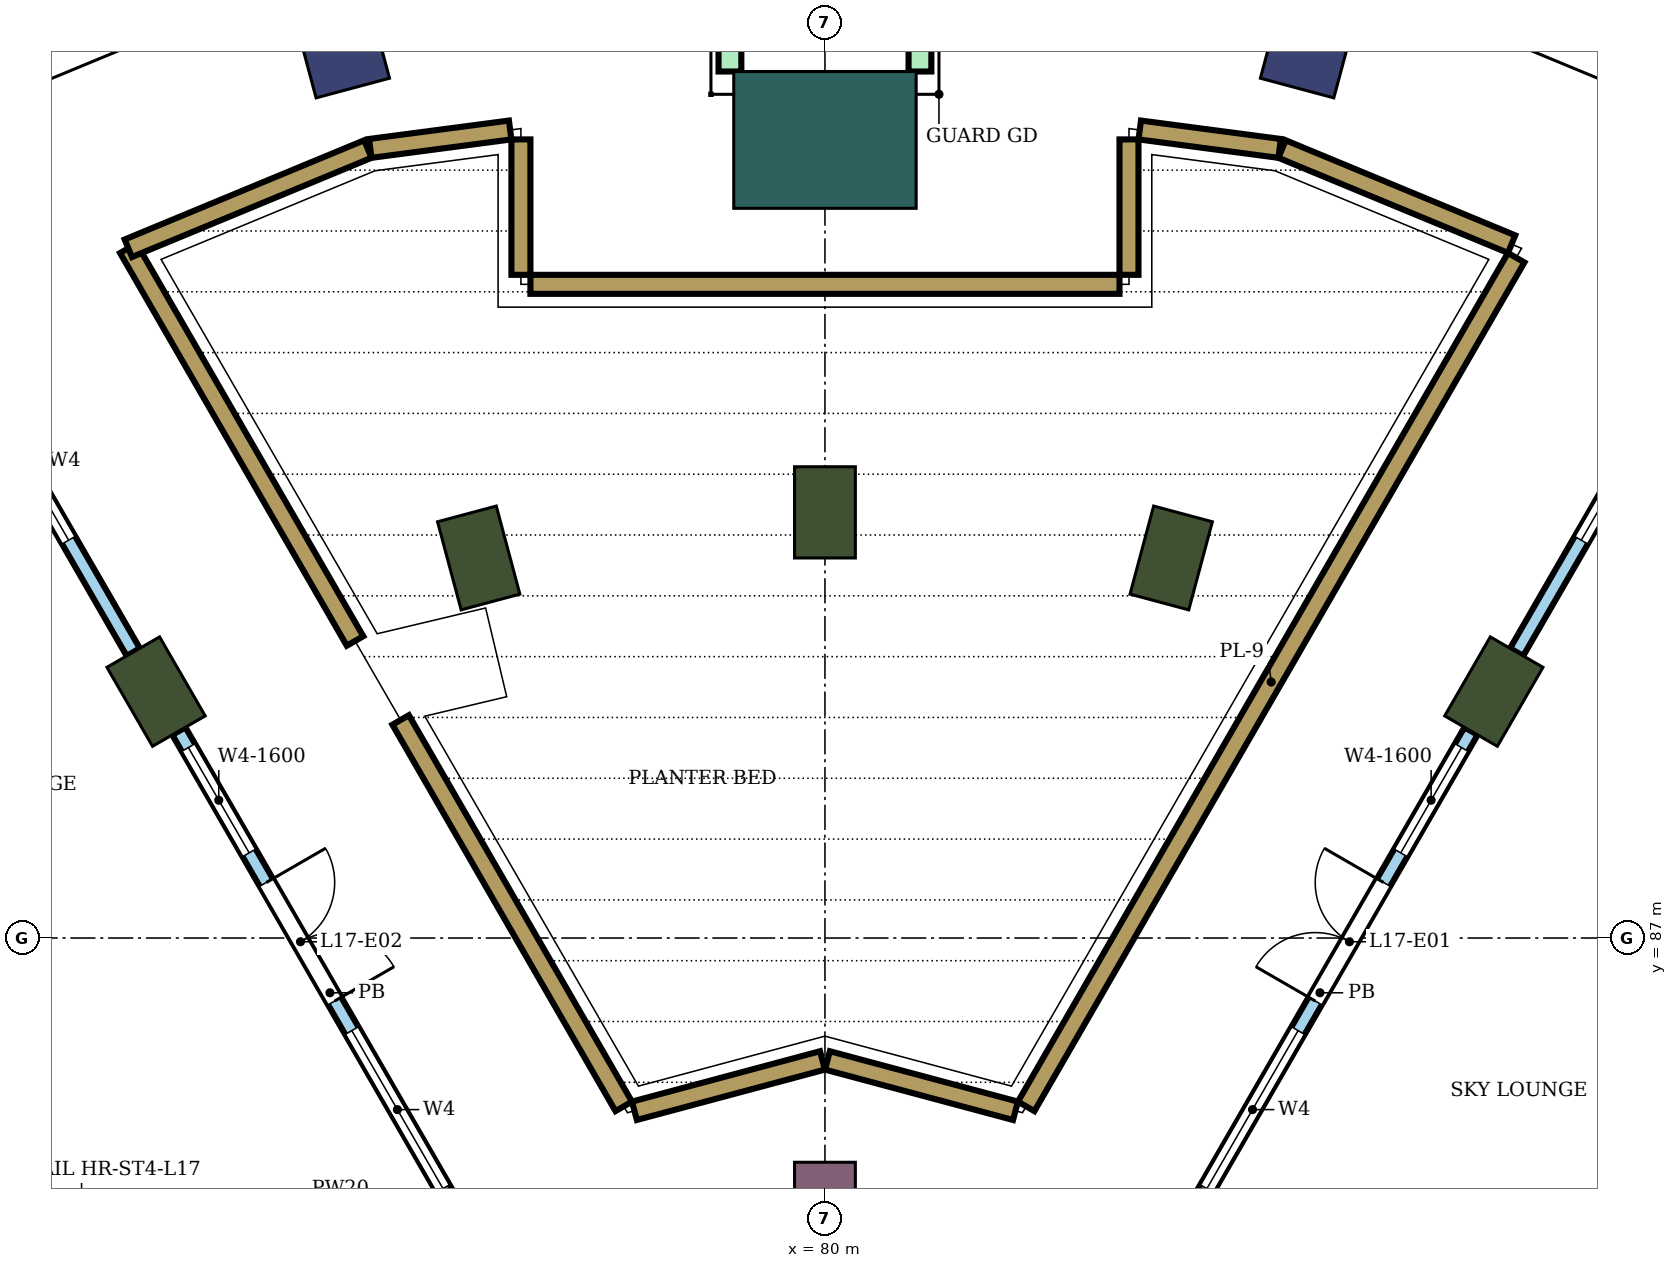
"""IFC4 building model, lengths in metres.
Left out: names, types, materials, properties, quantities, classifications, styles, units other than length and angle.
Written with IfcOpenShell. Run it as: python <this file> out.ifc"""

import sys

from ifc_helpers import new_model, si_unit, direction, frame, frame_2d, origin, origin_2d, place, context, subcontext, project, spatial, rectangle, extrude, element, fill, save


model = new_model("IFC4")
c1 = context("Model", 3, precision=1e-05, world=origin(), true_north=direction((0.0, 1.0)))
c2 = subcontext(c1, "Body", "Model", "MODEL_VIEW")
j1 = project(units=[si_unit("LENGTHUNIT", "METRE"), si_unit("PLANEANGLEUNIT", "RADIAN")], contexts=[c1])
p1 = place(None, origin())
s1 = spatial("IfcSite", under=j1, at=p1, CompositionType="ELEMENT")
p2 = place(p1, origin())
s2 = spatial("IfcBuilding", under=s1, at=p2, CompositionType="ELEMENT")
p3 = place(p2, frame((0.0, 0.0, 74.4)))
s3 = spatial("IfcBuildingStorey", under=s2, at=p3, CompositionType="ELEMENT", Elevation=74.4)
for number, where, z_axis, x_axis in (
    (1, (86.367, 98.762, 0.0), (0.0, 0.0, 1.0), (0.259, 0.966, 0.0)),
    (2, (73.633, 98.762, 0.0), (0.0, 0.0, 1.0), (-0.259, 0.966, 0.0)),
):
    element("IfcColumn", number, at=place(p3, frame(where, z_axis=z_axis, x_axis=x_axis)), inside=s3, PredefinedType="COLUMN", context=c2, shape_type="SweptSolid", body=[
        extrude(rectangle(XDim=1.2, YDim=1.0, at=origin_2d()), origin(), (0.0, 0.0, 1.0), 8.0),
    ])
for number, where, z_axis, x_axis in (
    (3, (88.8, 90.242, 0.0), (0.0, 0.0, 1.0), (0.5, 0.866, 0.0)),
    (4, (84.555, 92.0, 0.0), (0.0, 0.0, 1.0), (0.259, 0.966, 0.0)),
    (5, (80.0, 92.6, 0.0), (0.0, 0.0, 1.0), (0.0, 1.0, 0.0)),
    (6, (75.445, 92.0, 0.0), (0.0, 0.0, 1.0), (-0.259, 0.966, 0.0)),
    (7, (71.2, 90.242, 0.0), (0.0, 0.0, 1.0), (-0.5, 0.866, 0.0)),
):
    element("IfcColumn", number, at=place(p3, frame(where, z_axis=z_axis, x_axis=x_axis)), inside=s3, PredefinedType="COLUMN", context=c2, shape_type="SweptSolid", body=[
        extrude(rectangle(XDim=1.2, YDim=0.8, at=origin_2d()), origin(), (0.0, 0.0, 1.0), 8.0),
    ])
p4 = place(p3, frame((80.0, 83.6, 0.0), z_axis=(0.0, 0.0, 1.0), x_axis=(0.0, 1.0, 0.0)))
e8 = element("IfcColumn", 8, at=p4, inside=s3, PredefinedType="COLUMN", context=c2, shape_type="SweptSolid", body=[
    extrude(rectangle(XDim=0.9, YDim=0.8, at=origin_2d()), origin(), (0.0, 0.0, 1.0), 8.0),
])
p5 = place(p3, frame((80.0, 97.5, 0.0), z_axis=(0.0, 0.0, 1.0), x_axis=(0.0, 1.0, 0.0)))
e9 = element("IfcColumn", 9, at=p5, inside=s3, PredefinedType="COLUMN", context=c2, shape_type="SweptSolid", body=[
    extrude(rectangle(XDim=1.8, YDim=2.4, at=origin_2d()), origin(), (0.0, 0.0, 1.0), 8.0),
])
for number, where, z_axis, x_axis in (
    (10, (81.25, 98.4, 0.0), (0.0, 0.0, 1.0), (0.0, 1.0, 0.0)),
    (11, (78.75, 98.4, 0.0), (0.0, 0.0, 1.0), (0.0, 1.0, 0.0)),
):
    element("IfcWall", number, at=place(p3, frame(where, z_axis=z_axis, x_axis=x_axis)), inside=s3, PredefinedType="NOTDEFINED", context=c2, shape_type="SweptSolid", body=[
        extrude(rectangle(XDim=2.416, YDim=0.3, at=frame_2d((1.208, 0.0))), origin(), (0.0, 0.0, 1.0), 8.0),
    ])
p6 = place(p3, frame((70.835, 96.074, 0.0), z_axis=(0.0, 0.0, 1.0), x_axis=(0.500003486784, -0.866023390679, 0.0)))
e12 = element("IfcWall", 12, at=p6, inside=s3, PredefinedType="USERDEFINED", context=c2, shape_type="SweptSolid", body=[
    extrude(rectangle(XDim=5.966, YDim=0.25, at=frame_2d((2.983, 0.0))), origin(), (0.0, 0.0, 1.0), 0.6),
])
p7 = place(p3, frame((74.418, 89.869, 0.0), z_axis=(0.0, 0.0, 1.0), x_axis=(0.499999689456, -0.866025583077, 0.0)))
e13 = element("IfcWall", 13, at=p7, inside=s3, PredefinedType="USERDEFINED", context=c2, shape_type="SweptSolid", body=[
    extrude(rectangle(XDim=5.87, YDim=0.25, at=frame_2d((2.935, 0.0))), origin(), (0.0, 0.0, 1.0), 0.6),
])
for number, where, z_axis, x_axis in (
    (14, (77.493, 84.727, 0.0), (0.0, 0.0, 1.0), (0.966, 0.259, 0.0)),
    (15, (80.032, 85.39, 0.0), (0.0, 0.0, 1.0), (0.966, -0.259, 0.0)),
):
    element("IfcWall", number, at=place(p3, frame(where, z_axis=z_axis, x_axis=x_axis)), inside=s3, PredefinedType="USERDEFINED", context=c2, shape_type="SweptSolid", body=[
        extrude(rectangle(XDim=2.562, YDim=0.25, at=frame_2d((1.281, 0.0))), origin(), (0.0, 0.0, 1.0), 0.6),
    ])
p8 = place(p3, frame((82.647, 84.785, 0.0), z_axis=(0.0, 0.0, 1.0), x_axis=(0.499992370413, 0.866029808684, 0.0)))
e16 = element("IfcWall", 16, at=p8, inside=s3, PredefinedType="USERDEFINED", context=c2, shape_type="SweptSolid", body=[
    extrude(rectangle(XDim=12.893, YDim=0.25, at=frame_2d((6.446, 0.0))), origin(), (0.0, 0.0, 1.0), 0.6),
])
p9 = place(p3, frame((89.033, 96.129, 0.0), z_axis=(0.0, 0.0, 1.0), x_axis=(-0.923863886655, 0.382721202621, 0.0)))
e17 = element("IfcWall", 17, at=p9, inside=s3, PredefinedType="USERDEFINED", context=c2, shape_type="SweptSolid", body=[
    extrude(rectangle(XDim=3.269, YDim=0.25, at=frame_2d((1.634, 0.0))), origin(), (0.0, 0.0, 1.0), 0.6),
])
p10 = place(p3, frame((85.982, 97.388, 0.0), z_axis=(0.0, 0.0, 1.0), x_axis=(-0.991436829887, 0.130587182926, 0.0)))
e18 = element("IfcWall", 18, at=p10, inside=s3, PredefinedType="USERDEFINED", context=c2, shape_type="SweptSolid", body=[
    extrude(rectangle(XDim=1.856, YDim=0.25, at=frame_2d((0.928, 0.0))), origin(), (0.0, 0.0, 1.0), 0.6),
])
p11 = place(p3, frame((84.0, 97.507, 0.0), z_axis=(0.0, 0.0, 1.0), x_axis=(0.0, -1.0, 0.0)))
e19 = element("IfcWall", 19, at=p11, inside=s3, PredefinedType="USERDEFINED", context=c2, shape_type="SweptSolid", body=[
    extrude(rectangle(XDim=1.781, YDim=0.25, at=frame_2d((0.891, 0.0))), origin(), (0.0, 0.0, 1.0), 0.6),
])
p12 = place(p3, frame((83.875, 95.6, 0.0), z_axis=(0.0, 0.0, 1.0), x_axis=(-1.0, 0.0, 0.0)))
e20 = element("IfcWall", 20, at=p12, inside=s3, PredefinedType="USERDEFINED", context=c2, shape_type="SweptSolid", body=[
    extrude(rectangle(XDim=7.75, YDim=0.25, at=frame_2d((3.875, 0.0))), origin(), (0.0, 0.0, 1.0), 0.6),
])
p13 = place(p3, frame((76.0, 95.725, 0.0), z_axis=(0.0, 0.0, 1.0), x_axis=(0.0, 1.0, 0.0)))
e21 = element("IfcWall", 21, at=p13, inside=s3, PredefinedType="USERDEFINED", context=c2, shape_type="SweptSolid", body=[
    extrude(rectangle(XDim=1.781, YDim=0.25, at=frame_2d((0.891, 0.0))), origin(), (0.0, 0.0, 1.0), 0.6),
])
p14 = place(p3, frame((75.859, 97.631, 0.0), z_axis=(0.0, 0.0, 1.0), x_axis=(-0.991436829887, -0.130587182926, 0.0)))
e22 = element("IfcWall", 22, at=p14, inside=s3, PredefinedType="USERDEFINED", context=c2, shape_type="SweptSolid", body=[
    extrude(rectangle(XDim=1.856, YDim=0.25, at=frame_2d((0.928, 0.0))), origin(), (0.0, 0.0, 1.0), 0.6),
])
p15 = place(p3, frame((73.986, 97.38, 0.0), z_axis=(0.0, 0.0, 1.0), x_axis=(-0.923871147788, -0.38270367425, 0.0)))
e23 = element("IfcWall", 23, at=p15, inside=s3, PredefinedType="USERDEFINED", context=c2, shape_type="SweptSolid", body=[
    extrude(rectangle(XDim=3.411, YDim=0.25, at=frame_2d((1.706, 0.0))), origin(), (0.0, 0.0, 1.0), 0.6),
])
p16 = place(p3, frame((84.525, 82.838, 0.0), z_axis=(0.0, 0.0, 1.0), x_axis=(0.50001663867, 0.86601579723, 0.0)))
e24 = element("IfcWall", 24, at=p16, inside=s3, PredefinedType="NOTDEFINED", context=c2, shape_type="SweptSolid", body=[
    extrude(rectangle(XDim=7.95, YDim=0.2, at=frame_2d((3.975, 0.0))), origin(), (0.0, 0.0, 1.0), 8.0),
])
p17 = place(p16, frame((1.0, 0.0, 0.3)))
e25 = element("IfcOpeningElement", 25, at=p17, cuts=e24, PredefinedType="OPENING", context=c2, shape_type="SweptSolid", body=[
    extrude(rectangle(XDim=2.4, YDim=3.6, at=frame_2d((1.2, 1.8))), frame((0.0, 0.11, 0.0), z_axis=(0.0, -1.0, 0.0), x_axis=(1.0, 0.0, 0.0)), (0.0, 0.0, 1.0), 0.22),
])
p18 = place(p16, frame((3.85, 0.0, 0.0)))
e26 = element("IfcOpeningElement", 26, at=p18, cuts=e24, PredefinedType="OPENING", context=c2, shape_type="SweptSolid", body=[
    extrude(rectangle(XDim=1.8, YDim=2.4, at=frame_2d((0.9, 1.2))), frame((0.0, 0.11, 0.0), z_axis=(0.0, -1.0, 0.0), x_axis=(1.0, 0.0, 0.0)), (0.0, 0.0, 1.0), 0.22),
])
p19 = place(p16, frame((6.1, 0.0, 0.3)))
e27 = element("IfcOpeningElement", 27, at=p19, cuts=e24, PredefinedType="OPENING", context=c2, shape_type="SweptSolid", body=[
    extrude(rectangle(XDim=1.6, YDim=3.6, at=frame_2d((0.8, 1.8))), frame((0.0, 0.11, 0.0), z_axis=(0.0, -1.0, 0.0), x_axis=(1.0, 0.0, 0.0)), (0.0, 0.0, 1.0), 0.22),
])
p20 = place(p3, frame((89.1, 90.762, 0.0), z_axis=(0.0, 0.0, 1.0), x_axis=(0.499987231761, 0.866032775405, 0.0)))
e28 = element("IfcWall", 28, at=p20, inside=s3, PredefinedType="NOTDEFINED", context=c2, shape_type="SweptSolid", body=[
    extrude(rectangle(XDim=5.8, YDim=0.2, at=frame_2d((2.9, 0.0))), origin(), (0.0, 0.0, 1.0), 8.0),
])
p21 = place(p20, frame((1.7, 0.0, 0.3)))
e29 = element("IfcOpeningElement", 29, at=p21, cuts=e28, PredefinedType="OPENING", context=c2, shape_type="SweptSolid", body=[
    extrude(rectangle(XDim=2.4, YDim=3.6, at=frame_2d((1.2, 1.8))), frame((0.0, 0.11, 0.0), z_axis=(0.0, -1.0, 0.0), x_axis=(1.0, 0.0, 0.0)), (0.0, 0.0, 1.0), 0.22),
])
p22 = place(p3, frame((75.475, 82.838, 0.0), z_axis=(0.0, 0.0, 1.0), x_axis=(-0.50001663867, 0.86601579723, 0.0)))
e30 = element("IfcWall", 30, at=p22, inside=s3, PredefinedType="NOTDEFINED", context=c2, shape_type="SweptSolid", body=[
    extrude(rectangle(XDim=7.95, YDim=0.2, at=frame_2d((3.975, 0.0))), origin(), (0.0, 0.0, 1.0), 8.0),
])
p23 = place(p22, frame((1.0, 0.0, 0.3)))
e31 = element("IfcOpeningElement", 31, at=p23, cuts=e30, PredefinedType="OPENING", context=c2, shape_type="SweptSolid", body=[
    extrude(rectangle(XDim=2.4, YDim=3.6, at=frame_2d((1.2, 1.8))), frame((0.0, 0.11, 0.0), z_axis=(0.0, -1.0, 0.0), x_axis=(1.0, 0.0, 0.0)), (0.0, 0.0, 1.0), 0.22),
])
p24 = place(p22, frame((3.85, 0.0, 0.0)))
e32 = element("IfcOpeningElement", 32, at=p24, cuts=e30, PredefinedType="OPENING", context=c2, shape_type="SweptSolid", body=[
    extrude(rectangle(XDim=1.8, YDim=2.4, at=frame_2d((0.9, 1.2))), frame((0.0, 0.11, 0.0), z_axis=(0.0, -1.0, 0.0), x_axis=(1.0, 0.0, 0.0)), (0.0, 0.0, 1.0), 0.22),
])
p25 = place(p22, frame((6.1, 0.0, 0.3)))
e33 = element("IfcOpeningElement", 33, at=p25, cuts=e30, PredefinedType="OPENING", context=c2, shape_type="SweptSolid", body=[
    extrude(rectangle(XDim=1.6, YDim=3.6, at=frame_2d((0.8, 1.8))), frame((0.0, 0.11, 0.0), z_axis=(0.0, -1.0, 0.0), x_axis=(1.0, 0.0, 0.0)), (0.0, 0.0, 1.0), 0.22),
])
p26 = place(p3, frame((70.9, 90.762, 0.0), z_axis=(0.0, 0.0, 1.0), x_axis=(-0.499987231761, 0.866032775405, 0.0)))
e34 = element("IfcWall", 34, at=p26, inside=s3, PredefinedType="NOTDEFINED", context=c2, shape_type="SweptSolid", body=[
    extrude(rectangle(XDim=5.8, YDim=0.2, at=frame_2d((2.9, 0.0))), origin(), (0.0, 0.0, 1.0), 8.0),
])
p27 = place(p26, frame((1.7, 0.0, 0.3)))
e35 = element("IfcOpeningElement", 35, at=p27, cuts=e34, PredefinedType="OPENING", context=c2, shape_type="SweptSolid", body=[
    extrude(rectangle(XDim=2.4, YDim=3.6, at=frame_2d((1.2, 1.8))), frame((0.0, 0.11, 0.0), z_axis=(0.0, -1.0, 0.0), x_axis=(1.0, 0.0, 0.0)), (0.0, 0.0, 1.0), 0.22),
])
p28 = place(p17, origin())
e36 = element("IfcWindow", 36, at=p28, inside=s3, PartitioningType="SINGLE_PANEL", PredefinedType="WINDOW", context=c2, shape_type="SweptSolid", body=[
    extrude(rectangle(XDim=2.4, YDim=3.6, at=frame_2d((1.2, 1.8))), frame((0.0, 0.03, 0.0), z_axis=(0.0, -1.0, 0.0), x_axis=(1.0, 0.0, 0.0)), (0.0, 0.0, 1.0), 0.06),
])
fill(e25, e36)
p29 = place(p18, origin())
e37 = element("IfcDoor", 37, at=p29, inside=s3, OperationType="DOUBLE_DOOR_SINGLE_SWING", PredefinedType="DOOR", context=c2, shape_type="SweptSolid", body=[
    extrude(rectangle(XDim=1.8, YDim=2.4, at=frame_2d((0.9, 1.2))), frame((0.0, 0.025, 0.0), z_axis=(0.0, -1.0, 0.0), x_axis=(1.0, 0.0, 0.0)), (0.0, 0.0, 1.0), 0.05),
])
fill(e26, e37)
p30 = place(p19, origin())
e38 = element("IfcWindow", 38, at=p30, inside=s3, PartitioningType="SINGLE_PANEL", PredefinedType="WINDOW", context=c2, shape_type="SweptSolid", body=[
    extrude(rectangle(XDim=1.6, YDim=3.6, at=frame_2d((0.8, 1.8))), frame((0.0, 0.03, 0.0), z_axis=(0.0, -1.0, 0.0), x_axis=(1.0, 0.0, 0.0)), (0.0, 0.0, 1.0), 0.06),
])
fill(e27, e38)
p31 = place(p21, origin())
e39 = element("IfcWindow", 39, at=p31, inside=s3, PartitioningType="SINGLE_PANEL", PredefinedType="WINDOW", context=c2, shape_type="SweptSolid", body=[
    extrude(rectangle(XDim=2.4, YDim=3.6, at=frame_2d((1.2, 1.8))), frame((0.0, 0.03, 0.0), z_axis=(0.0, -1.0, 0.0), x_axis=(1.0, 0.0, 0.0)), (0.0, 0.0, 1.0), 0.06),
])
fill(e29, e39)
p32 = place(p23, origin())
e40 = element("IfcWindow", 40, at=p32, inside=s3, PartitioningType="SINGLE_PANEL", PredefinedType="WINDOW", context=c2, shape_type="SweptSolid", body=[
    extrude(rectangle(XDim=2.4, YDim=3.6, at=frame_2d((1.2, 1.8))), frame((0.0, 0.03, 0.0), z_axis=(0.0, -1.0, 0.0), x_axis=(1.0, 0.0, 0.0)), (0.0, 0.0, 1.0), 0.06),
])
fill(e31, e40)
p33 = place(p24, frame((1.8, 0.0, 0.0), z_axis=(0.0, 0.0, 1.0), x_axis=(-1.0, 0.0, 0.0)))
e41 = element("IfcDoor", 41, at=p33, inside=s3, OperationType="DOUBLE_DOOR_SINGLE_SWING", PredefinedType="DOOR", context=c2, shape_type="SweptSolid", body=[
    extrude(rectangle(XDim=1.8, YDim=2.4, at=frame_2d((0.9, 1.2))), frame((0.0, 0.025, 0.0), z_axis=(0.0, -1.0, 0.0), x_axis=(1.0, 0.0, 0.0)), (0.0, 0.0, 1.0), 0.05),
])
fill(e32, e41)
p34 = place(p25, origin())
e42 = element("IfcWindow", 42, at=p34, inside=s3, PartitioningType="SINGLE_PANEL", PredefinedType="WINDOW", context=c2, shape_type="SweptSolid", body=[
    extrude(rectangle(XDim=1.6, YDim=3.6, at=frame_2d((0.8, 1.8))), frame((0.0, 0.03, 0.0), z_axis=(0.0, -1.0, 0.0), x_axis=(1.0, 0.0, 0.0)), (0.0, 0.0, 1.0), 0.06),
])
fill(e33, e42)
p35 = place(p27, origin())
e43 = element("IfcWindow", 43, at=p35, inside=s3, PartitioningType="SINGLE_PANEL", PredefinedType="WINDOW", context=c2, shape_type="SweptSolid", body=[
    extrude(rectangle(XDim=2.4, YDim=3.6, at=frame_2d((1.2, 1.8))), frame((0.0, 0.03, 0.0), z_axis=(0.0, -1.0, 0.0), x_axis=(1.0, 0.0, 0.0)), (0.0, 0.0, 1.0), 0.06),
])
fill(e35, e43)
save(model, sys.argv[1])
